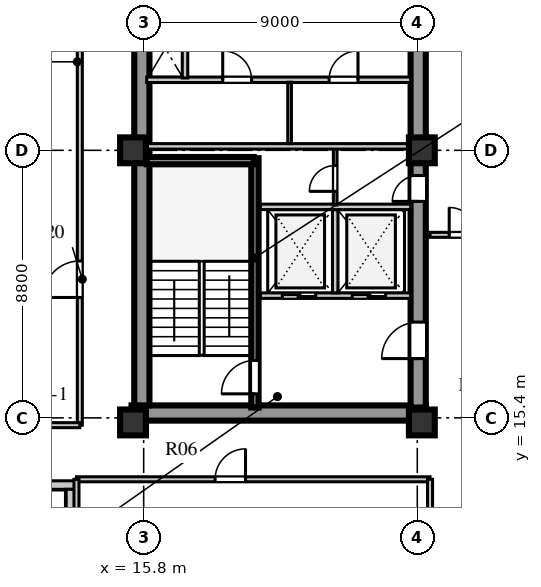
"""IFC4 building model, lengths in metres.
Left out: names, types, materials, properties, quantities, classifications, styles, units other than length and angle.
Written with IfcOpenShell. Run it as: python <this file> out.ifc"""

import sys

from ifc_helpers import new_model, si_unit, direction, frame, frame_2d, origin, origin_2d, place, context, subcontext, project, spatial, rectangle, extrude, element, fill, save


model = new_model("IFC4")
c1 = context("Model", 3, precision=1e-05, world=origin(), true_north=direction((0.0, 1.0)))
c2 = subcontext(c1, "Body", "Model", "MODEL_VIEW")
j1 = project(units=[si_unit("LENGTHUNIT", "METRE"), si_unit("PLANEANGLEUNIT", "RADIAN")], contexts=[c1])
p1 = place(None, origin())
s1 = spatial("IfcSite", under=j1, at=p1, CompositionType="ELEMENT")
p2 = place(p1, origin())
s2 = spatial("IfcBuilding", under=s1, at=p2, CompositionType="ELEMENT")
p3 = place(p2, frame((0.0, 0.0, 142.5)))
s3 = spatial("IfcBuildingStorey", under=s2, at=p3, CompositionType="ELEMENT", Elevation=142.5)
p4 = place(p3, frame((15.4, 15.56, 0.0), z_axis=(0.0, 0.0, 1.0), x_axis=(1.0, 0.0, 0.0)))
e1 = element("IfcWall", 1, at=p4, inside=s3, PredefinedType="SHEAR", context=c2, shape_type="SweptSolid", body=[
    extrude(rectangle(XDim=9.68, YDim=0.5, at=frame_2d((4.84, 0.0))), origin(), (0.0, 0.0, 1.0), 3.6),
])
p5 = place(p3, frame((15.74, 15.81, 0.0), z_axis=(0.0, 0.0, 1.0), x_axis=(0.0, 1.0, 0.0)))
e2 = element("IfcWall", 2, at=p5, inside=s3, PredefinedType="SHEAR", context=c2, shape_type="SweptSolid", body=[
    extrude(rectangle(XDim=25.63, YDim=0.5, at=frame_2d((12.815, 0.0))), origin(), (0.0, 0.0, 1.0), 3.6),
])
p6 = place(p3, frame((24.83, 15.74, 0.0), z_axis=(0.0, 0.0, 1.0), x_axis=(0.0, 1.0, 0.0)))
e3 = element("IfcWall", 3, at=p6, inside=s3, PredefinedType="SHEAR", context=c2, shape_type="SweptSolid", body=[
    extrude(rectangle(XDim=25.76, YDim=0.5, at=frame_2d((12.88, 0.0))), origin(), (0.0, 0.0, 1.0), 3.6),
])
p7 = place(p6, frame((1.61, 0.0, 0.0)))
e4 = element("IfcOpeningElement", 4, at=p7, cuts=e3, PredefinedType="OPENING", context=c2, shape_type="SweptSolid", body=[
    extrude(rectangle(XDim=1.2, YDim=2.1, at=frame_2d((0.6, 1.05))), frame((0.0, 0.26, 0.0), z_axis=(0.0, -1.0, 0.0), x_axis=(1.0, 0.0, 0.0)), (0.0, 0.0, 1.0), 0.52),
])
p8 = place(p6, frame((6.78, 0.0, 0.0)))
e5 = element("IfcOpeningElement", 5, at=p8, cuts=e3, PredefinedType="OPENING", context=c2, shape_type="SweptSolid", body=[
    extrude(rectangle(XDim=0.85, YDim=2.06, at=frame_2d((0.425, 1.03))), frame((0.0, 0.26, 0.0), z_axis=(0.0, -1.0, 0.0), x_axis=(1.0, 0.0, 0.0)), (0.0, 0.0, 1.0), 0.52),
])
p9 = place(p6, frame((12.11, 0.0, 0.0)))
e6 = element("IfcOpeningElement", 6, at=p9, cuts=e3, PredefinedType="OPENING", context=c2, shape_type="SweptSolid", body=[
    extrude(rectangle(XDim=1.5, YDim=2.12, at=frame_2d((0.75, 1.06))), frame((0.0, 0.26, 0.0), z_axis=(0.0, -1.0, 0.0), x_axis=(1.0, 0.0, 0.0)), (0.0, 0.0, 1.0), 0.52),
])
p10 = place(p6, frame((20.11, 0.0, 0.0)))
e7 = element("IfcOpeningElement", 7, at=p10, cuts=e3, PredefinedType="OPENING", context=c2, shape_type="SweptSolid", body=[
    extrude(rectangle(XDim=1.2, YDim=2.12, at=frame_2d((0.6, 1.06))), frame((0.0, 0.26, 0.0), z_axis=(0.0, -1.0, 0.0), x_axis=(1.0, 0.0, 0.0)), (0.0, 0.0, 1.0), 0.52),
])
p11 = place(p6, frame((24.01, 0.0, 0.0)))
e8 = element("IfcOpeningElement", 8, at=p11, cuts=e3, PredefinedType="OPENING", context=c2, shape_type="SweptSolid", body=[
    extrude(rectangle(XDim=0.95, YDim=2.1, at=frame_2d((0.475, 1.05))), frame((0.0, 0.26, 0.0), z_axis=(0.0, -1.0, 0.0), x_axis=(1.0, 0.0, 0.0)), (0.0, 0.0, 1.0), 0.52),
])
for number, where, z_axis, x_axis in (
    (9, (15.45, 15.25, 0.0), (0.0, 0.0, 1.0), (1.0, 0.0, 0.0)),
    (10, (15.45, 24.2, 0.0), (0.0, 0.0, 1.0), (1.0, 0.0, 0.0)),
    (11, (24.95, 15.25, 0.0), (0.0, 0.0, 1.0), (1.0, 0.0, 0.0)),
    (12, (24.95, 24.2, 0.0), (0.0, 0.0, 1.0), (1.0, 0.0, 0.0)),
):
    element("IfcColumn", number, at=place(p3, frame(where, z_axis=z_axis, x_axis=x_axis)), inside=s3, PredefinedType="COLUMN", context=c2, shape_type="SweptSolid", body=[
        extrude(rectangle(XDim=0.85, YDim=0.85, at=origin_2d()), origin(), (0.0, 0.0, 1.0), 3.6),
    ])
p12 = place(p3, frame((10.2, 13.19, 0.0), z_axis=(0.0, 0.0, 1.0), x_axis=(1.0, 0.0, 0.0)))
e13 = element("IfcWall", 13, at=p12, inside=s3, PredefinedType="STANDARD", context=c2, shape_type="SweptSolid", body=[
    extrude(rectangle(XDim=3.33, YDim=0.28, at=frame_2d((1.665, 0.0))), origin(), (0.0, 0.0, 1.0), 3.6),
])
p13 = place(p3, frame((13.39, 13.05, 0.0), z_axis=(0.0, 0.0, 1.0), x_axis=(0.0, -1.0, 0.0)))
e14 = element("IfcWall", 14, at=p13, inside=s3, PredefinedType="STANDARD", context=c2, shape_type="SweptSolid", body=[
    extrude(rectangle(XDim=2.77, YDim=0.28, at=frame_2d((1.385, 0.0))), origin(), (0.0, 0.0, 1.0), 3.6),
])
p14 = place(p3, frame((19.46, 15.74, 0.0), z_axis=(0.0, 0.0, 1.0), x_axis=(0.0, 1.0, 0.0)))
e15 = element("IfcWall", 15, at=p14, inside=s3, PredefinedType="SHEAR", context=c2, shape_type="SweptSolid", body=[
    extrude(rectangle(XDim=8.2, YDim=0.24, at=frame_2d((4.1, 0.0))), origin(), (0.0, 0.0, 1.0), 3.85),
])
p15 = place(p14, frame((0.45, 0.0, 0.0)))
e16 = element("IfcOpeningElement", 16, at=p15, cuts=e15, PredefinedType="OPENING", context=c2, shape_type="SweptSolid", body=[
    extrude(rectangle(XDim=1.1, YDim=2.1, at=frame_2d((0.55, 1.05))), frame((0.0, 0.13, 0.0), z_axis=(0.0, -1.0, 0.0), x_axis=(1.0, 0.0, 0.0)), (0.0, 0.0, 1.0), 0.26),
])
p16 = place(p3, frame((15.9, 23.86, 0.0), z_axis=(0.0, 0.0, 1.0), x_axis=(1.0, 0.0, 0.0)))
e17 = element("IfcWall", 17, at=p16, inside=s3, PredefinedType="SHEAR", context=c2, shape_type="SweptSolid", body=[
    extrude(rectangle(XDim=3.52, YDim=0.24, at=frame_2d((1.76, 0.0))), origin(), (0.0, 0.0, 1.0), 3.85),
])
p17 = place(p3, frame((19.64, 19.42, 0.0), z_axis=(0.0, 0.0, 1.0), x_axis=(1.0, 0.0, 0.0)))
e18 = element("IfcWall", 18, at=p17, inside=s3, PredefinedType="SOLIDWALL", context=c2, shape_type="SweptSolid", body=[
    extrude(rectangle(XDim=4.94, YDim=0.18, at=frame_2d((2.47, 0.0))), origin(), (0.0, 0.0, 1.0), 3.6),
])
p18 = place(p17, frame((0.72, 0.0, 0.0)))
e19 = element("IfcOpeningElement", 19, at=p18, cuts=e18, PredefinedType="OPENING", context=c2, shape_type="SweptSolid", body=[
    extrude(rectangle(XDim=1.1, YDim=2.1, at=frame_2d((0.55, 1.05))), frame((0.0, 0.1, 0.0), z_axis=(0.0, -1.0, 0.0), x_axis=(1.0, 0.0, 0.0)), (0.0, 0.0, 1.0), 0.2),
])
p19 = place(p17, frame((3.02, 0.0, 0.0)))
e20 = element("IfcOpeningElement", 20, at=p19, cuts=e18, PredefinedType="OPENING", context=c2, shape_type="SweptSolid", body=[
    extrude(rectangle(XDim=1.1, YDim=2.1, at=frame_2d((0.55, 1.05))), frame((0.0, 0.1, 0.0), z_axis=(0.0, -1.0, 0.0), x_axis=(1.0, 0.0, 0.0)), (0.0, 0.0, 1.0), 0.2),
])
p20 = place(p3, frame((22.1, 19.51, 0.0), z_axis=(0.0, 0.0, 1.0), x_axis=(0.0, 1.0, 0.0)))
e21 = element("IfcWall", 21, at=p20, inside=s3, PredefinedType="SOLIDWALL", context=c2, shape_type="SweptSolid", body=[
    extrude(rectangle(XDim=2.74, YDim=0.18, at=frame_2d((1.37, 0.0))), origin(), (0.0, 0.0, 1.0), 3.6),
])
p21 = place(p3, frame((19.64, 22.34, 0.0), z_axis=(0.0, 0.0, 1.0), x_axis=(1.0, 0.0, 0.0)))
e22 = element("IfcWall", 22, at=p21, inside=s3, PredefinedType="SOLIDWALL", context=c2, shape_type="SweptSolid", body=[
    extrude(rectangle(XDim=4.94, YDim=0.18, at=frame_2d((2.47, 0.0))), origin(), (0.0, 0.0, 1.0), 3.6),
])
p22 = place(p3, frame((22.1, 22.4, 0.0), z_axis=(0.0, 0.0, 1.0), x_axis=(0.0, 1.0, 0.0)))
e23 = element("IfcWall", 23, at=p22, inside=s3, PredefinedType="PARTITIONING", context=c2, shape_type="SweptSolid", body=[
    extrude(rectangle(XDim=1.88, YDim=0.12, at=frame_2d((0.94, 0.0))), origin(), (0.0, 0.0, 1.0), 3.6),
])
p23 = place(p22, frame((0.45, 0.0, 0.0)))
e24 = element("IfcOpeningElement", 24, at=p23, cuts=e23, PredefinedType="OPENING", context=c2, shape_type="SweptSolid", body=[
    extrude(rectangle(XDim=0.85, YDim=2.06, at=frame_2d((0.425, 1.03))), frame((0.0, 0.07, 0.0), z_axis=(0.0, -1.0, 0.0), x_axis=(1.0, 0.0, 0.0)), (0.0, 0.0, 1.0), 0.14),
])
p24 = place(p3, frame((15.9, 26.52, 0.0), z_axis=(0.0, 0.0, 1.0), x_axis=(1.0, 0.0, 0.0)))
e25 = element("IfcWall", 25, at=p24, inside=s3, PredefinedType="SOLIDWALL", context=c2, shape_type="SweptSolid", body=[
    extrude(rectangle(XDim=8.68, YDim=0.18, at=frame_2d((4.34, 0.0))), origin(), (0.0, 0.0, 1.0), 3.6),
])
p25 = place(p24, frame((2.5, 0.0, 0.0)))
e26 = element("IfcOpeningElement", 26, at=p25, cuts=e25, PredefinedType="OPENING", context=c2, shape_type="SweptSolid", body=[
    extrude(rectangle(XDim=0.95, YDim=2.1, at=frame_2d((0.475, 1.05))), frame((0.0, 0.1, 0.0), z_axis=(0.0, -1.0, 0.0), x_axis=(1.0, 0.0, 0.0)), (0.0, 0.0, 1.0), 0.2),
])
p26 = place(p24, frame((6.0, 0.0, 0.0)))
e27 = element("IfcOpeningElement", 27, at=p26, cuts=e25, PredefinedType="OPENING", context=c2, shape_type="SweptSolid", body=[
    extrude(rectangle(XDim=0.95, YDim=2.1, at=frame_2d((0.475, 1.05))), frame((0.0, 0.1, 0.0), z_axis=(0.0, -1.0, 0.0), x_axis=(1.0, 0.0, 0.0)), (0.0, 0.0, 1.0), 0.2),
])
p27 = place(p3, frame((15.9, 24.33, 0.0), z_axis=(0.0, 0.0, 1.0), x_axis=(1.0, 0.0, 0.0)))
e28 = element("IfcWall", 28, at=p27, inside=s3, PredefinedType="SOLIDWALL", context=c2, shape_type="SweptSolid", body=[
    extrude(rectangle(XDim=8.68, YDim=0.18, at=frame_2d((4.34, 0.0))), origin(), (0.0, 0.0, 1.0), 2.95),
])
p28 = place(p3, frame((20.6, 24.42, 0.0), z_axis=(0.0, 0.0, 1.0), x_axis=(0.0, 1.0, 0.0)))
e29 = element("IfcWall", 29, at=p28, inside=s3, PredefinedType="PARTITIONING", context=c2, shape_type="SweptSolid", body=[
    extrude(rectangle(XDim=2.02, YDim=0.12, at=frame_2d((1.01, 0.0))), origin(), (0.0, 0.0, 1.0), 3.6),
])
p29 = place(p3, frame((17.16, 26.58, 0.0), z_axis=(0.0, 0.0, 1.0), x_axis=(0.0, 1.0, 0.0)))
e30 = element("IfcWall", 30, at=p29, inside=s3, PredefinedType="SOLIDWALL", context=c2, shape_type="SweptSolid", body=[
    extrude(rectangle(XDim=4.02, YDim=0.18, at=frame_2d((2.01, 0.0))), origin(), (0.0, 0.0, 1.0), 3.6),
])
p30 = place(p29, frame((2.35, 0.0, 0.0)))
e31 = element("IfcOpeningElement", 31, at=p30, cuts=e30, PredefinedType="OPENING", context=c2, shape_type="SweptSolid", body=[
    extrude(rectangle(XDim=0.85, YDim=2.06, at=frame_2d((0.425, 1.03))), frame((0.0, 0.1, 0.0), z_axis=(0.0, -1.0, 0.0), x_axis=(1.0, 0.0, 0.0)), (0.0, 0.0, 1.0), 0.2),
])
p31 = place(p3, frame((25.22, 21.42, 0.0), z_axis=(0.0, 0.0, 1.0), x_axis=(1.0, 0.0, 0.0)))
e32 = element("IfcWall", 32, at=p31, inside=s3, PredefinedType="PARTITIONING", context=c2, shape_type="SweptSolid", body=[
    extrude(rectangle(XDim=15.6, YDim=0.165, at=frame_2d((7.8, 0.0))), origin(), (0.0, 0.0, 1.0), 3.2),
])
p32 = place(p31, frame((0.63, 0.0, 0.0)))
e33 = element("IfcOpeningElement", 33, at=p32, cuts=e32, PredefinedType="OPENING", context=c2, shape_type="SweptSolid", body=[
    extrude(rectangle(XDim=0.9, YDim=2.08, at=frame_2d((0.45, 1.04))), frame((0.0, 0.093, 0.0), z_axis=(0.0, -1.0, 0.0), x_axis=(1.0, 0.0, 0.0)), (0.0, 0.0, 1.0), 0.185),
])
p33 = place(p31, frame((3.71, 0.0, 0.0)))
e34 = element("IfcOpeningElement", 34, at=p33, cuts=e32, PredefinedType="OPENING", context=c2, shape_type="SweptSolid", body=[
    extrude(rectangle(XDim=0.9, YDim=2.08, at=frame_2d((0.45, 1.04))), frame((0.0, 0.093, 0.0), z_axis=(0.0, -1.0, 0.0), x_axis=(1.0, 0.0, 0.0)), (0.0, 0.0, 1.0), 0.185),
])
p34 = place(p31, frame((6.81, 0.0, 0.0)))
e35 = element("IfcOpeningElement", 35, at=p34, cuts=e32, PredefinedType="OPENING", context=c2, shape_type="SweptSolid", body=[
    extrude(rectangle(XDim=0.9, YDim=2.08, at=frame_2d((0.45, 1.04))), frame((0.0, 0.093, 0.0), z_axis=(0.0, -1.0, 0.0), x_axis=(1.0, 0.0, 0.0)), (0.0, 0.0, 1.0), 0.185),
])
p35 = place(p31, frame((9.91, 0.0, 0.0)))
e36 = element("IfcOpeningElement", 36, at=p35, cuts=e32, PredefinedType="OPENING", context=c2, shape_type="SweptSolid", body=[
    extrude(rectangle(XDim=0.9, YDim=2.08, at=frame_2d((0.45, 1.04))), frame((0.0, 0.093, 0.0), z_axis=(0.0, -1.0, 0.0), x_axis=(1.0, 0.0, 0.0)), (0.0, 0.0, 1.0), 0.185),
])
p36 = place(p31, frame((13.01, 0.0, 0.0)))
e37 = element("IfcOpeningElement", 37, at=p36, cuts=e32, PredefinedType="OPENING", context=c2, shape_type="SweptSolid", body=[
    extrude(rectangle(XDim=0.9, YDim=2.08, at=frame_2d((0.45, 1.04))), frame((0.0, 0.093, 0.0), z_axis=(0.0, -1.0, 0.0), x_axis=(1.0, 0.0, 0.0)), (0.0, 0.0, 1.0), 0.185),
])
p37 = place(p3, frame((13.7, 15.16, 0.0), z_axis=(0.0, 0.0, 1.0), x_axis=(0.0, 1.0, 0.0)))
e38 = element("IfcWall", 38, at=p37, inside=s3, PredefinedType="PARTITIONING", context=c2, shape_type="SweptSolid", body=[
    extrude(rectangle(XDim=26.88, YDim=0.165, at=frame_2d((13.44, 0.0))), origin(), (0.0, 0.0, 1.0), 3.6),
])
p38 = place(p37, frame((4.2, 0.0, 0.0)))
e39 = element("IfcOpeningElement", 39, at=p38, cuts=e38, PredefinedType="OPENING", context=c2, shape_type="SweptSolid", body=[
    extrude(rectangle(XDim=1.2, YDim=2.1, at=frame_2d((0.6, 1.05))), frame((0.0, 0.093, 0.0), z_axis=(0.0, -1.0, 0.0), x_axis=(1.0, 0.0, 0.0)), (0.0, 0.0, 1.0), 0.185),
])
p39 = place(p37, frame((18.5, 0.0, 0.0)))
e40 = element("IfcOpeningElement", 40, at=p39, cuts=e38, PredefinedType="OPENING", context=c2, shape_type="SweptSolid", body=[
    extrude(rectangle(XDim=1.2, YDim=2.1, at=frame_2d((0.6, 1.05))), frame((0.0, 0.093, 0.0), z_axis=(0.0, -1.0, 0.0), x_axis=(1.0, 0.0, 0.0)), (0.0, 0.0, 1.0), 0.185),
])
p40 = place(p3, frame((10.48, 15.16, 0.0), z_axis=(0.0, 0.0, 1.0), x_axis=(1.0, 0.0, 0.0)))
e41 = element("IfcWall", 41, at=p40, inside=s3, PredefinedType="PARTITIONING", context=c2, shape_type="SweptSolid", body=[
    extrude(rectangle(XDim=3.22, YDim=0.165, at=frame_2d((1.61, 0.0))), origin(), (0.0, 0.0, 1.0), 3.1),
])
p41 = place(p3, frame((13.59, 13.38, 0.0), z_axis=(0.0, 0.0, 1.0), x_axis=(1.0, 0.0, 0.0)))
e42 = element("IfcWall", 42, at=p41, inside=s3, PredefinedType="PARTITIONING", context=c2, shape_type="SweptSolid", body=[
    extrude(rectangle(XDim=11.63, YDim=0.165, at=frame_2d((5.815, 0.0))), origin(), (0.0, 0.0, 1.0), 3.6),
])
p42 = place(p41, frame((4.56, 0.0, 0.0)))
e43 = element("IfcOpeningElement", 43, at=p42, cuts=e42, PredefinedType="OPENING", context=c2, shape_type="SweptSolid", body=[
    extrude(rectangle(XDim=1.0, YDim=2.08, at=frame_2d((0.5, 1.04))), frame((0.0, 0.093, 0.0), z_axis=(0.0, -1.0, 0.0), x_axis=(1.0, 0.0, 0.0)), (0.0, 0.0, 1.0), 0.185),
])
p43 = place(p3, frame((13.59, 10.28, 0.0), z_axis=(0.0, 0.0, 1.0), x_axis=(0.0, 1.0, 0.0)))
e44 = element("IfcWall", 44, at=p43, inside=s3, PredefinedType="PARTITIONING", context=c2, shape_type="SweptSolid", body=[
    extrude(rectangle(XDim=3.1, YDim=0.165, at=frame_2d((1.55, 0.0))), origin(), (0.0, 0.0, 1.0), 3.6),
])
p44 = place(p3, frame((25.22, 10.28, 0.0), z_axis=(0.0, 0.0, 1.0), x_axis=(0.0, 1.0, 0.0)))
e45 = element("IfcWall", 45, at=p44, inside=s3, PredefinedType="PARTITIONING", context=c2, shape_type="SweptSolid", body=[
    extrude(rectangle(XDim=3.1, YDim=0.165, at=frame_2d((1.55, 0.0))), origin(), (0.0, 0.0, 1.0), 3.1),
])
p45 = place(p15, origin())
e46 = element("IfcDoor", 46, at=p45, inside=s3, OperationType="SINGLE_SWING_LEFT", PredefinedType="DOOR", context=c2, shape_type="SweptSolid", body=[
    extrude(rectangle(XDim=1.1, YDim=2.1, at=frame_2d((0.55, 1.05))), frame((0.0, 0.025, 0.0), z_axis=(0.0, -1.0, 0.0), x_axis=(1.0, 0.0, 0.0)), (0.0, 0.0, 1.0), 0.05),
])
fill(e16, e46)
p46 = place(p18, origin())
e47 = element("IfcDoor", 47, at=p46, inside=s3, OperationType="DOUBLE_DOOR_SLIDING", PredefinedType="DOOR", context=c2, shape_type="SweptSolid", body=[
    extrude(rectangle(XDim=1.1, YDim=2.1, at=frame_2d((0.55, 1.05))), frame((0.0, 0.025, 0.0), z_axis=(0.0, -1.0, 0.0), x_axis=(1.0, 0.0, 0.0)), (0.0, 0.0, 1.0), 0.05),
])
fill(e19, e47)
p47 = place(p19, origin())
e48 = element("IfcDoor", 48, at=p47, inside=s3, OperationType="DOUBLE_DOOR_SLIDING", PredefinedType="DOOR", context=c2, shape_type="SweptSolid", body=[
    extrude(rectangle(XDim=1.1, YDim=2.1, at=frame_2d((0.55, 1.05))), frame((0.0, 0.025, 0.0), z_axis=(0.0, -1.0, 0.0), x_axis=(1.0, 0.0, 0.0)), (0.0, 0.0, 1.0), 0.05),
])
fill(e20, e48)
p48 = place(p7, frame((1.2, 0.0, 0.0), z_axis=(0.0, 0.0, 1.0), x_axis=(-1.0, 0.0, 0.0)))
e49 = element("IfcDoor", 49, at=p48, inside=s3, OperationType="SINGLE_SWING_RIGHT", PredefinedType="DOOR", context=c2, shape_type="SweptSolid", body=[
    extrude(rectangle(XDim=1.2, YDim=2.1, at=frame_2d((0.6, 1.05))), frame((0.0, 0.025, 0.0), z_axis=(0.0, -1.0, 0.0), x_axis=(1.0, 0.0, 0.0)), (0.0, 0.0, 1.0), 0.05),
])
fill(e4, e49)
p49 = place(p23, origin())
e50 = element("IfcDoor", 50, at=p49, inside=s3, OperationType="SINGLE_SWING_LEFT", PredefinedType="DOOR", context=c2, shape_type="SweptSolid", body=[
    extrude(rectangle(XDim=0.85, YDim=2.06, at=frame_2d((0.425, 1.03))), frame((0.0, 0.025, 0.0), z_axis=(0.0, -1.0, 0.0), x_axis=(1.0, 0.0, 0.0)), (0.0, 0.0, 1.0), 0.05),
])
fill(e24, e50)
p50 = place(p8, frame((0.85, 0.0, 0.0), z_axis=(0.0, 0.0, 1.0), x_axis=(-1.0, 0.0, 0.0)))
e51 = element("IfcDoor", 51, at=p50, inside=s3, OperationType="SINGLE_SWING_RIGHT", PredefinedType="DOOR", context=c2, shape_type="SweptSolid", body=[
    extrude(rectangle(XDim=0.85, YDim=2.06, at=frame_2d((0.425, 1.03))), frame((0.0, 0.025, 0.0), z_axis=(0.0, -1.0, 0.0), x_axis=(1.0, 0.0, 0.0)), (0.0, 0.0, 1.0), 0.05),
])
fill(e5, e51)
p51 = place(p25, origin())
e52 = element("IfcDoor", 52, at=p51, inside=s3, OperationType="SINGLE_SWING_LEFT", PredefinedType="DOOR", context=c2, shape_type="SweptSolid", body=[
    extrude(rectangle(XDim=0.95, YDim=2.1, at=frame_2d((0.475, 1.05))), frame((0.0, 0.025, 0.0), z_axis=(0.0, -1.0, 0.0), x_axis=(1.0, 0.0, 0.0)), (0.0, 0.0, 1.0), 0.05),
])
fill(e26, e52)
p52 = place(p26, origin())
e53 = element("IfcDoor", 53, at=p52, inside=s3, OperationType="SINGLE_SWING_RIGHT", PredefinedType="DOOR", context=c2, shape_type="SweptSolid", body=[
    extrude(rectangle(XDim=0.95, YDim=2.1, at=frame_2d((0.475, 1.05))), frame((0.0, 0.025, 0.0), z_axis=(0.0, -1.0, 0.0), x_axis=(1.0, 0.0, 0.0)), (0.0, 0.0, 1.0), 0.05),
])
fill(e27, e53)
p53 = place(p42, frame((1.0, 0.0, 0.0), z_axis=(0.0, 0.0, 1.0), x_axis=(-1.0, 0.0, 0.0)))
e54 = element("IfcDoor", 54, at=p53, inside=s3, OperationType="SINGLE_SWING_LEFT", PredefinedType="DOOR", context=c2, shape_type="SweptSolid", body=[
    extrude(rectangle(XDim=1.0, YDim=2.08, at=frame_2d((0.5, 1.04))), frame((0.0, 0.025, 0.0), z_axis=(0.0, -1.0, 0.0), x_axis=(1.0, 0.0, 0.0)), (0.0, 0.0, 1.0), 0.05),
])
fill(e43, e54)
p54 = place(p38, origin())
e55 = element("IfcDoor", 55, at=p54, inside=s3, OperationType="SINGLE_SWING_LEFT", PredefinedType="DOOR", context=c2, shape_type="SweptSolid", body=[
    extrude(rectangle(XDim=1.2, YDim=2.1, at=frame_2d((0.6, 1.05))), frame((0.0, 0.025, 0.0), z_axis=(0.0, -1.0, 0.0), x_axis=(1.0, 0.0, 0.0)), (0.0, 0.0, 1.0), 0.05),
])
fill(e39, e55)
p55 = place(p32, frame((0.9, 0.0, 0.0), z_axis=(0.0, 0.0, 1.0), x_axis=(-1.0, 0.0, 0.0)))
e56 = element("IfcDoor", 56, at=p55, inside=s3, OperationType="SINGLE_SWING_RIGHT", PredefinedType="DOOR", context=c2, shape_type="SweptSolid", body=[
    extrude(rectangle(XDim=0.9, YDim=2.08, at=frame_2d((0.45, 1.04))), frame((0.0, 0.025, 0.0), z_axis=(0.0, -1.0, 0.0), x_axis=(1.0, 0.0, 0.0)), (0.0, 0.0, 1.0), 0.05),
])
fill(e33, e56)
save(model, sys.argv[1])
